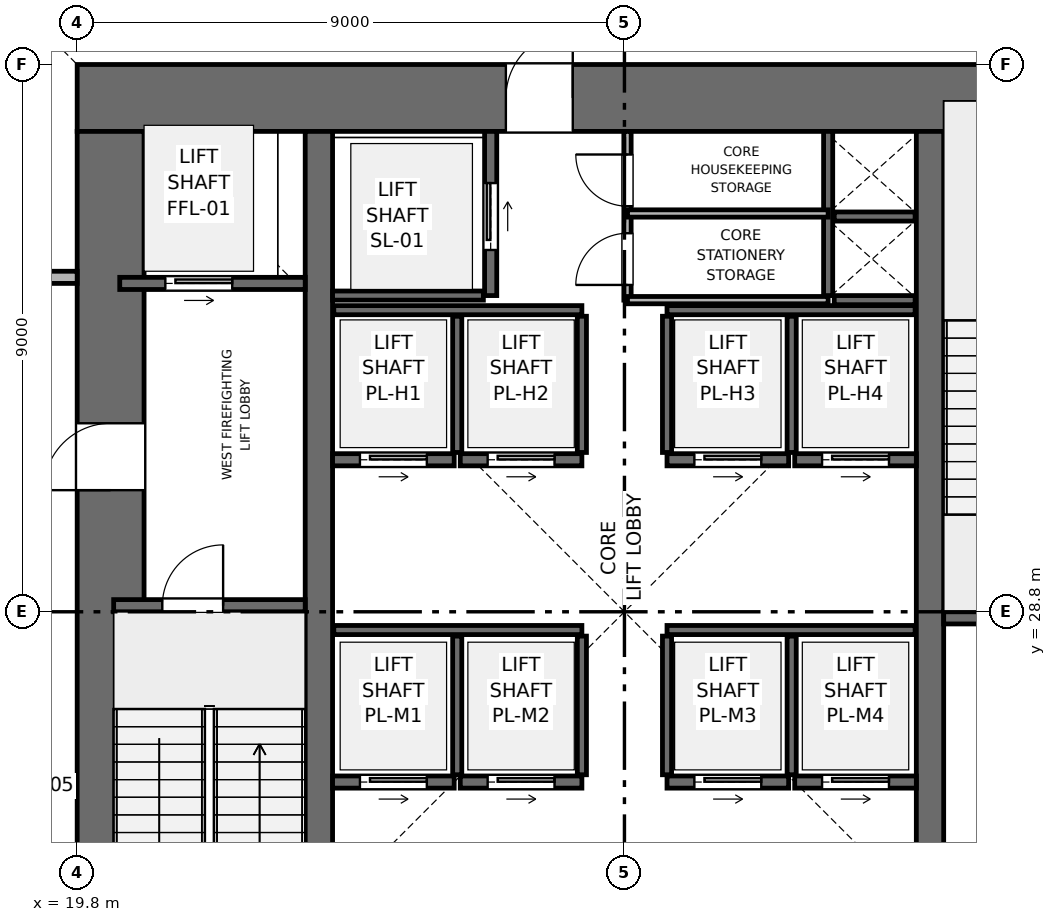
"""IFC4 building model, lengths in metres.
Left out: names, types, materials, properties, quantities, classifications, styles, units other than length and angle.
Written with IfcOpenShell. Run it as: python <this file> out.ifc"""

import sys

from ifc_helpers import new_model, si_unit, direction, frame, frame_2d, origin, place, context, subcontext, project, spatial, rectangle, extrude, element, fill, save


model = new_model("IFC4")
c1 = context("Model", 3, precision=1e-05, world=origin(), true_north=direction((0.0, 1.0)))
c2 = subcontext(c1, "Body", "Model", "MODEL_VIEW")
j1 = project(units=[si_unit("LENGTHUNIT", "METRE"), si_unit("PLANEANGLEUNIT", "RADIAN")], contexts=[c1])
p1 = place(None, origin())
s1 = spatial("IfcSite", under=j1, at=p1, CompositionType="ELEMENT")
p2 = place(p1, origin())
s2 = spatial("IfcBuilding", under=s1, at=p2, CompositionType="ELEMENT")
p3 = place(p2, origin())
s3 = spatial("IfcBuildingStorey", under=s2, at=p3, CompositionType="ELEMENT", Elevation=0.0)
p4 = place(p3, frame((19.8, 37.25, 0.0), z_axis=(0.0, 0.0, 1.0), x_axis=(1.0, 0.0, 0.0)))
e1 = element("IfcWall", 1, at=p4, inside=s3, PredefinedType="SHEAR", context=c2, shape_type="SweptSolid", body=[
    extrude(rectangle(XDim=18.0, YDim=1.1, at=frame_2d((9.0, 0.0))), origin(), (0.0, 0.0, 1.0), 8.4),
])
p5 = place(p4, frame((7.05, 0.0, 0.0)))
e2 = element("IfcOpeningElement", 2, at=p5, cuts=e1, PredefinedType="OPENING", context=c2, shape_type="SweptSolid", body=[
    extrude(rectangle(XDim=1.1, YDim=2.15, at=frame_2d((0.55, 1.075))), frame((0.0, 0.56, 0.0), z_axis=(0.0, -1.0, 0.0), x_axis=(1.0, 0.0, 0.0)), (0.0, 0.0, 1.0), 1.12),
])
p6 = place(p3, frame((20.35, 20.9, 0.0), z_axis=(0.0, 0.0, 1.0), x_axis=(0.0, 1.0, 0.0)))
e3 = element("IfcWall", 3, at=p6, inside=s3, PredefinedType="SHEAR", context=c2, shape_type="SweptSolid", body=[
    extrude(rectangle(XDim=15.8, YDim=1.1, at=frame_2d((7.9, 0.0))), origin(), (0.0, 0.0, 1.0), 8.4),
])
p7 = place(p6, frame((9.9, 0.0, 0.0)))
e4 = element("IfcOpeningElement", 4, at=p7, cuts=e3, PredefinedType="OPENING", context=c2, shape_type="SweptSolid", body=[
    extrude(rectangle(XDim=1.1, YDim=2.15, at=frame_2d((0.55, 1.075))), frame((0.0, 0.56, 0.0), z_axis=(0.0, -1.0, 0.0), x_axis=(1.0, 0.0, 0.0)), (0.0, 0.0, 1.0), 1.12),
])
for number, where, z_axis, x_axis in (
    (5, (23.775, 20.9, 0.0), (0.0, 0.0, 1.0), (0.0, 1.0, 0.0)),
    (6, (33.825, 20.9, 0.0), (0.0, 0.0, 1.0), (0.0, 1.0, 0.0)),
):
    element("IfcWall", number, at=place(p3, frame(where, z_axis=z_axis, x_axis=x_axis)), inside=s3, PredefinedType="SHEAR", context=c2, shape_type="SweptSolid", body=[
        extrude(rectangle(XDim=15.8, YDim=0.45, at=frame_2d((7.9, 0.0))), origin(), (0.0, 0.0, 1.0), 8.4),
    ])
p8 = place(p3, frame((20.4, 28.9, 0.0), z_axis=(0.0, 0.0, 1.0), x_axis=(1.0, 0.0, 0.0)))
e7 = element("IfcWall", 7, at=p8, inside=s3, PredefinedType="SHEAR", context=c2, shape_type="SweptSolid", body=[
    extrude(rectangle(XDim=3.15, YDim=0.2, at=frame_2d((1.575, 0.0))), origin(), (0.0, 0.0, 1.0), 8.05),
])
p9 = place(p8, frame((0.8, 0.0, 0.0)))
e8 = element("IfcOpeningElement", 8, at=p9, cuts=e7, PredefinedType="OPENING", context=c2, shape_type="SweptSolid", body=[
    extrude(rectangle(XDim=1.0, YDim=2.1, at=frame_2d((0.5, 1.05))), frame((0.0, 0.11, 0.0), z_axis=(0.0, -1.0, 0.0), x_axis=(1.0, 0.0, 0.0)), (0.0, 0.0, 1.0), 0.22),
])
p10 = place(p3, frame((34.05, 28.7, 0.0), z_axis=(0.0, 0.0, 1.0), x_axis=(1.0, 0.0, 0.0)))
e9 = element("IfcWall", 9, at=p10, inside=s3, PredefinedType="SHEAR", context=c2, shape_type="SweptSolid", body=[
    extrude(rectangle(XDim=3.15, YDim=0.2, at=frame_2d((1.575, 0.0))), origin(), (0.0, 0.0, 1.0), 8.05),
])
p11 = place(p10, frame((0.8, 0.0, 0.0)))
e10 = element("IfcOpeningElement", 10, at=p11, cuts=e9, PredefinedType="OPENING", context=c2, shape_type="SweptSolid", body=[
    extrude(rectangle(XDim=1.0, YDim=2.1, at=frame_2d((0.5, 1.05))), frame((0.0, 0.11, 0.0), z_axis=(0.0, -1.0, 0.0), x_axis=(1.0, 0.0, 0.0)), (0.0, 0.0, 1.0), 0.22),
])
p12 = place(p3, frame((32.15, 34.0, 0.0), z_axis=(0.0, 0.0, 1.0), x_axis=(0.0, 1.0, 0.0)))
e11 = element("IfcWall", 11, at=p12, inside=s3, PredefinedType="SHEAR", context=c2, shape_type="SweptSolid", body=[
    extrude(rectangle(XDim=2.7, YDim=0.15, at=frame_2d((1.35, 0.0))), origin(), (0.0, 0.0, 1.0), 8.05),
])
for number, where, z_axis, x_axis in (
    (12, (32.25, 33.925, 0.0), (0.0, 0.0, 1.0), (1.0, 0.0, 0.0)),
    (13, (32.25, 35.3, 0.0), (0.0, 0.0, 1.0), (1.0, 0.0, 0.0)),
):
    element("IfcWall", number, at=place(p3, frame(where, z_axis=z_axis, x_axis=x_axis)), inside=s3, PredefinedType="SHEAR", context=c2, shape_type="SweptSolid", body=[
        extrude(rectangle(XDim=1.33, YDim=0.15, at=frame_2d((0.665, 0.0))), origin(), (0.0, 0.0, 1.0), 8.05),
    ])
p13 = place(p3, frame((20.5, 34.2, 0.0), z_axis=(0.0, 0.0, 1.0), x_axis=(1.0, 0.0, 0.0)))
e14 = element("IfcWall", 14, at=p13, inside=s3, PredefinedType="SHEAR", context=c2, shape_type="SweptSolid", body=[
    extrude(rectangle(XDim=3.05, YDim=0.2, at=frame_2d((1.525, 0.0))), origin(), (0.0, 0.0, 1.0), 8.05),
])
p14 = place(p13, frame((0.75, 0.0, 0.0)))
e15 = element("IfcOpeningElement", 15, at=p14, cuts=e14, PredefinedType="OPENING", context=c2, shape_type="SweptSolid", body=[
    extrude(rectangle(XDim=1.1, YDim=2.15, at=frame_2d((0.55, 1.075))), frame((0.0, 0.11, 0.0), z_axis=(0.0, -1.0, 0.0), x_axis=(1.0, 0.0, 0.0)), (0.0, 0.0, 1.0), 0.22),
])
p15 = place(p3, frame((26.6, 34.0, 0.0), z_axis=(0.0, 0.0, 1.0), x_axis=(0.0, 1.0, 0.0)))
e16 = element("IfcWall", 16, at=p15, inside=s3, PredefinedType="SHEAR", context=c2, shape_type="SweptSolid", body=[
    extrude(rectangle(XDim=2.7, YDim=0.2, at=frame_2d((1.35, 0.0))), origin(), (0.0, 0.0, 1.0), 8.05),
])
p16 = place(p15, frame((0.75, 0.0, 0.0)))
e17 = element("IfcOpeningElement", 17, at=p16, cuts=e16, PredefinedType="OPENING", context=c2, shape_type="SweptSolid", body=[
    extrude(rectangle(XDim=1.1, YDim=2.15, at=frame_2d((0.55, 1.075))), frame((0.0, 0.11, 0.0), z_axis=(0.0, -1.0, 0.0), x_axis=(1.0, 0.0, 0.0)), (0.0, 0.0, 1.0), 0.22),
])
p17 = place(p3, frame((24.0, 34.0, 0.0), z_axis=(0.0, 0.0, 1.0), x_axis=(1.0, 0.0, 0.0)))
e18 = element("IfcWall", 18, at=p17, inside=s3, PredefinedType="SHEAR", context=c2, shape_type="SweptSolid", body=[
    extrude(rectangle(XDim=2.48, YDim=0.15, at=frame_2d((1.24, 0.0))), origin(), (0.0, 0.0, 1.0), 8.05),
])
p18 = place(p3, frame((24.0, 26.0, 0.0), z_axis=(0.0, 0.0, 1.0), x_axis=(1.0, 0.0, 0.0)))
e19 = element("IfcWall", 19, at=p18, inside=s3, PredefinedType="SHEAR", context=c2, shape_type="SweptSolid", body=[
    extrude(rectangle(XDim=2.0, YDim=0.2, at=frame_2d((1.0, 0.0))), origin(), (0.0, 0.0, 1.0), 8.05),
])
p19 = place(p18, frame((0.45, 0.0, 0.0)))
e20 = element("IfcOpeningElement", 20, at=p19, cuts=e19, PredefinedType="OPENING", context=c2, shape_type="SweptSolid", body=[
    extrude(rectangle(XDim=1.1, YDim=2.15, at=frame_2d((0.55, 1.075))), frame((0.0, 0.11, 0.0), z_axis=(0.0, -1.0, 0.0), x_axis=(1.0, 0.0, 0.0)), (0.0, 0.0, 1.0), 0.22),
])
p20 = place(p3, frame((26.1, 26.0, 0.0), z_axis=(0.0, 0.0, 1.0), x_axis=(1.0, 0.0, 0.0)))
e21 = element("IfcWall", 21, at=p20, inside=s3, PredefinedType="SHEAR", context=c2, shape_type="SweptSolid", body=[
    extrude(rectangle(XDim=2.0, YDim=0.2, at=frame_2d((1.0, 0.0))), origin(), (0.0, 0.0, 1.0), 8.05),
])
p21 = place(p20, frame((0.45, 0.0, 0.0)))
e22 = element("IfcOpeningElement", 22, at=p21, cuts=e21, PredefinedType="OPENING", context=c2, shape_type="SweptSolid", body=[
    extrude(rectangle(XDim=1.1, YDim=2.15, at=frame_2d((0.55, 1.075))), frame((0.0, 0.11, 0.0), z_axis=(0.0, -1.0, 0.0), x_axis=(1.0, 0.0, 0.0)), (0.0, 0.0, 1.0), 0.22),
])
p22 = place(p3, frame((29.5, 26.0, 0.0), z_axis=(0.0, 0.0, 1.0), x_axis=(1.0, 0.0, 0.0)))
e23 = element("IfcWall", 23, at=p22, inside=s3, PredefinedType="SHEAR", context=c2, shape_type="SweptSolid", body=[
    extrude(rectangle(XDim=2.0, YDim=0.2, at=frame_2d((1.0, 0.0))), origin(), (0.0, 0.0, 1.0), 8.05),
])
p23 = place(p22, frame((0.45, 0.0, 0.0)))
e24 = element("IfcOpeningElement", 24, at=p23, cuts=e23, PredefinedType="OPENING", context=c2, shape_type="SweptSolid", body=[
    extrude(rectangle(XDim=1.1, YDim=2.15, at=frame_2d((0.55, 1.075))), frame((0.0, 0.11, 0.0), z_axis=(0.0, -1.0, 0.0), x_axis=(1.0, 0.0, 0.0)), (0.0, 0.0, 1.0), 0.22),
])
p24 = place(p3, frame((31.6, 26.0, 0.0), z_axis=(0.0, 0.0, 1.0), x_axis=(1.0, 0.0, 0.0)))
e25 = element("IfcWall", 25, at=p24, inside=s3, PredefinedType="SHEAR", context=c2, shape_type="SweptSolid", body=[
    extrude(rectangle(XDim=2.0, YDim=0.2, at=frame_2d((1.0, 0.0))), origin(), (0.0, 0.0, 1.0), 8.05),
])
p25 = place(p24, frame((0.45, 0.0, 0.0)))
e26 = element("IfcOpeningElement", 26, at=p25, cuts=e25, PredefinedType="OPENING", context=c2, shape_type="SweptSolid", body=[
    extrude(rectangle(XDim=1.1, YDim=2.15, at=frame_2d((0.55, 1.075))), frame((0.0, 0.11, 0.0), z_axis=(0.0, -1.0, 0.0), x_axis=(1.0, 0.0, 0.0)), (0.0, 0.0, 1.0), 0.22),
])
p26 = place(p3, frame((24.0, 31.3, 0.0), z_axis=(0.0, 0.0, 1.0), x_axis=(1.0, 0.0, 0.0)))
e27 = element("IfcWall", 27, at=p26, inside=s3, PredefinedType="SHEAR", context=c2, shape_type="SweptSolid", body=[
    extrude(rectangle(XDim=2.0, YDim=0.2, at=frame_2d((1.0, 0.0))), origin(), (0.0, 0.0, 1.0), 8.05),
])
p27 = place(p26, frame((0.45, 0.0, 0.0)))
e28 = element("IfcOpeningElement", 28, at=p27, cuts=e27, PredefinedType="OPENING", context=c2, shape_type="SweptSolid", body=[
    extrude(rectangle(XDim=1.1, YDim=2.15, at=frame_2d((0.55, 1.075))), frame((0.0, 0.11, 0.0), z_axis=(0.0, -1.0, 0.0), x_axis=(1.0, 0.0, 0.0)), (0.0, 0.0, 1.0), 0.22),
])
p28 = place(p3, frame((26.1, 31.3, 0.0), z_axis=(0.0, 0.0, 1.0), x_axis=(1.0, 0.0, 0.0)))
e29 = element("IfcWall", 29, at=p28, inside=s3, PredefinedType="SHEAR", context=c2, shape_type="SweptSolid", body=[
    extrude(rectangle(XDim=2.0, YDim=0.2, at=frame_2d((1.0, 0.0))), origin(), (0.0, 0.0, 1.0), 8.05),
])
p29 = place(p28, frame((0.45, 0.0, 0.0)))
e30 = element("IfcOpeningElement", 30, at=p29, cuts=e29, PredefinedType="OPENING", context=c2, shape_type="SweptSolid", body=[
    extrude(rectangle(XDim=1.1, YDim=2.15, at=frame_2d((0.55, 1.075))), frame((0.0, 0.11, 0.0), z_axis=(0.0, -1.0, 0.0), x_axis=(1.0, 0.0, 0.0)), (0.0, 0.0, 1.0), 0.22),
])
p30 = place(p3, frame((29.5, 31.3, 0.0), z_axis=(0.0, 0.0, 1.0), x_axis=(1.0, 0.0, 0.0)))
e31 = element("IfcWall", 31, at=p30, inside=s3, PredefinedType="SHEAR", context=c2, shape_type="SweptSolid", body=[
    extrude(rectangle(XDim=2.0, YDim=0.2, at=frame_2d((1.0, 0.0))), origin(), (0.0, 0.0, 1.0), 8.05),
])
p31 = place(p30, frame((0.45, 0.0, 0.0)))
e32 = element("IfcOpeningElement", 32, at=p31, cuts=e31, PredefinedType="OPENING", context=c2, shape_type="SweptSolid", body=[
    extrude(rectangle(XDim=1.1, YDim=2.15, at=frame_2d((0.55, 1.075))), frame((0.0, 0.11, 0.0), z_axis=(0.0, -1.0, 0.0), x_axis=(1.0, 0.0, 0.0)), (0.0, 0.0, 1.0), 0.22),
])
p32 = place(p3, frame((31.6, 31.3, 0.0), z_axis=(0.0, 0.0, 1.0), x_axis=(1.0, 0.0, 0.0)))
e33 = element("IfcWall", 33, at=p32, inside=s3, PredefinedType="SHEAR", context=c2, shape_type="SweptSolid", body=[
    extrude(rectangle(XDim=2.0, YDim=0.2, at=frame_2d((1.0, 0.0))), origin(), (0.0, 0.0, 1.0), 8.05),
])
p33 = place(p32, frame((0.45, 0.0, 0.0)))
e34 = element("IfcOpeningElement", 34, at=p33, cuts=e33, PredefinedType="OPENING", context=c2, shape_type="SweptSolid", body=[
    extrude(rectangle(XDim=1.1, YDim=2.15, at=frame_2d((0.55, 1.075))), frame((0.0, 0.11, 0.0), z_axis=(0.0, -1.0, 0.0), x_axis=(1.0, 0.0, 0.0)), (0.0, 0.0, 1.0), 0.22),
])
for number, where, z_axis, x_axis in (
    (35, (24.02, 28.5, 0.0), (0.0, 0.0, 1.0), (1.0, 0.0, 0.0)),
    (36, (29.5, 28.5, 0.0), (0.0, 0.0, 1.0), (1.0, 0.0, 0.0)),
):
    element("IfcWall", number, at=place(p3, frame(where, z_axis=z_axis, x_axis=x_axis)), inside=s3, PredefinedType="SHEAR", context=c2, shape_type="SweptSolid", body=[
        extrude(rectangle(XDim=4.08, YDim=0.15, at=frame_2d((2.04, 0.0))), origin(), (0.0, 0.0, 1.0), 8.05),
    ])
for number, where, z_axis, x_axis in (
    (37, (26.05, 26.12, 0.0), (0.0, 0.0, 1.0), (0.0, 1.0, 0.0)),
    (38, (28.1, 26.12, 0.0), (0.0, 0.0, 1.0), (0.0, 1.0, 0.0)),
    (39, (29.5, 26.12, 0.0), (0.0, 0.0, 1.0), (0.0, 1.0, 0.0)),
    (40, (31.55, 26.12, 0.0), (0.0, 0.0, 1.0), (0.0, 1.0, 0.0)),
):
    element("IfcWall", number, at=place(p3, frame(where, z_axis=z_axis, x_axis=x_axis)), inside=s3, PredefinedType="SHEAR", context=c2, shape_type="SweptSolid", body=[
        extrude(rectangle(XDim=2.28, YDim=0.15, at=frame_2d((1.14, 0.0))), origin(), (0.0, 0.0, 1.0), 8.05),
    ])
for number, where, z_axis, x_axis in (
    (41, (24.02, 33.76, 0.0), (0.0, 0.0, 1.0), (1.0, 0.0, 0.0)),
    (42, (29.5, 33.76, 0.0), (0.0, 0.0, 1.0), (1.0, 0.0, 0.0)),
):
    element("IfcWall", number, at=place(p3, frame(where, z_axis=z_axis, x_axis=x_axis)), inside=s3, PredefinedType="SHEAR", context=c2, shape_type="SweptSolid", body=[
        extrude(rectangle(XDim=4.08, YDim=0.15, at=frame_2d((2.04, 0.0))), origin(), (0.0, 0.0, 1.0), 8.05),
    ])
for number, where, z_axis, x_axis in (
    (43, (26.05, 31.42, 0.0), (0.0, 0.0, 1.0), (0.0, 1.0, 0.0)),
    (44, (28.1, 31.42, 0.0), (0.0, 0.0, 1.0), (0.0, 1.0, 0.0)),
    (45, (29.5, 31.42, 0.0), (0.0, 0.0, 1.0), (0.0, 1.0, 0.0)),
    (46, (31.55, 31.42, 0.0), (0.0, 0.0, 1.0), (0.0, 1.0, 0.0)),
):
    element("IfcWall", number, at=place(p3, frame(where, z_axis=z_axis, x_axis=x_axis)), inside=s3, PredefinedType="SHEAR", context=c2, shape_type="SweptSolid", body=[
        extrude(rectangle(XDim=2.24, YDim=0.15, at=frame_2d((1.12, 0.0))), origin(), (0.0, 0.0, 1.0), 8.05),
    ])
p34 = place(p3, frame((28.85, 33.925, 0.0), z_axis=(0.0, 0.0, 1.0), x_axis=(0.0, 1.0, 0.0)))
e47 = element("IfcWall", 47, at=p34, inside=s3, PredefinedType="PARTITIONING", context=c2, shape_type="SweptSolid", body=[
    extrude(rectangle(XDim=2.775, YDim=0.12, at=frame_2d((1.387, 0.0))), origin(), (0.0, 0.0, 1.0), 8.05),
])
p35 = place(p34, frame((0.25, 0.0, 0.0)))
e48 = element("IfcOpeningElement", 48, at=p35, cuts=e47, PredefinedType="OPENING", context=c2, shape_type="SweptSolid", body=[
    extrude(rectangle(XDim=0.85, YDim=2.1, at=frame_2d((0.425, 1.05))), frame((0.0, 0.07, 0.0), z_axis=(0.0, -1.0, 0.0), x_axis=(1.0, 0.0, 0.0)), (0.0, 0.0, 1.0), 0.14),
])
p36 = place(p34, frame((1.545, 0.0, 0.0)))
e49 = element("IfcOpeningElement", 49, at=p36, cuts=e47, PredefinedType="OPENING", context=c2, shape_type="SweptSolid", body=[
    extrude(rectangle(XDim=0.85, YDim=2.1, at=frame_2d((0.425, 1.05))), frame((0.0, 0.07, 0.0), z_axis=(0.0, -1.0, 0.0), x_axis=(1.0, 0.0, 0.0)), (0.0, 0.0, 1.0), 0.14),
])
for number, where, z_axis, x_axis in (
    (50, (28.85, 35.35, 0.0), (0.0, 0.0, 1.0), (1.0, 0.0, 0.0)),
    (51, (28.85, 33.925, 0.0), (0.0, 0.0, 1.0), (1.0, 0.0, 0.0)),
):
    element("IfcWall", number, at=place(p3, frame(where, z_axis=z_axis, x_axis=x_axis)), inside=s3, PredefinedType="PARTITIONING", context=c2, shape_type="SweptSolid", body=[
        extrude(rectangle(XDim=3.3, YDim=0.12, at=frame_2d((1.65, 0.0))), origin(), (0.0, 0.0, 1.0), 8.05),
    ])
p37 = place(p3, frame((9.15, 34.3, 0.0), z_axis=(0.0, 0.0, 1.0), x_axis=(1.0, 0.0, 0.0)))
e52 = element("IfcWall", 52, at=p37, inside=s3, PredefinedType="PARTITIONING", context=c2, shape_type="SweptSolid", body=[
    extrude(rectangle(XDim=10.65, YDim=0.2, at=frame_2d((5.325, 0.0))), origin(), (0.0, 0.0, 1.0), 8.05),
])
p38 = place(p37, frame((4.2, 0.0, 0.0)))
e53 = element("IfcOpeningElement", 53, at=p38, cuts=e52, PredefinedType="OPENING", context=c2, shape_type="SweptSolid", body=[
    extrude(rectangle(XDim=1.0, YDim=2.15, at=frame_2d((0.5, 1.075))), frame((0.0, 0.11, 0.0), z_axis=(0.0, -1.0, 0.0), x_axis=(1.0, 0.0, 0.0)), (0.0, 0.0, 1.0), 0.22),
])
p39 = place(p9, origin())
e54 = element("IfcDoor", 54, at=p39, inside=s3, OperationType="SINGLE_SWING_RIGHT", PredefinedType="DOOR", context=c2, shape_type="SweptSolid", body=[
    extrude(rectangle(XDim=1.0, YDim=2.1, at=frame_2d((0.5, 1.05))), frame((0.0, 0.025, 0.0), z_axis=(0.0, -1.0, 0.0), x_axis=(1.0, 0.0, 0.0)), (0.0, 0.0, 1.0), 0.05),
])
fill(e8, e54)
p40 = place(p14, origin())
e55 = element("IfcDoor", 55, at=p40, inside=s3, OperationType="SLIDING_TO_RIGHT", PredefinedType="DOOR", context=c2, shape_type="SweptSolid", body=[
    extrude(rectangle(XDim=1.1, YDim=2.15, at=frame_2d((0.55, 1.075))), frame((0.0, 0.025, 0.0), z_axis=(0.0, -1.0, 0.0), x_axis=(1.0, 0.0, 0.0)), (0.0, 0.0, 1.0), 0.05),
])
fill(e15, e55)
p41 = place(p16, origin())
e56 = element("IfcDoor", 56, at=p41, inside=s3, OperationType="SLIDING_TO_RIGHT", PredefinedType="DOOR", context=c2, shape_type="SweptSolid", body=[
    extrude(rectangle(XDim=1.1, YDim=2.15, at=frame_2d((0.55, 1.075))), frame((0.0, 0.025, 0.0), z_axis=(0.0, -1.0, 0.0), x_axis=(1.0, 0.0, 0.0)), (0.0, 0.0, 1.0), 0.05),
])
fill(e17, e56)
p42 = place(p19, origin())
e57 = element("IfcDoor", 57, at=p42, inside=s3, OperationType="SLIDING_TO_RIGHT", PredefinedType="DOOR", context=c2, shape_type="SweptSolid", body=[
    extrude(rectangle(XDim=1.1, YDim=2.15, at=frame_2d((0.55, 1.075))), frame((0.0, 0.025, 0.0), z_axis=(0.0, -1.0, 0.0), x_axis=(1.0, 0.0, 0.0)), (0.0, 0.0, 1.0), 0.05),
])
fill(e20, e57)
p43 = place(p21, origin())
e58 = element("IfcDoor", 58, at=p43, inside=s3, OperationType="SLIDING_TO_RIGHT", PredefinedType="DOOR", context=c2, shape_type="SweptSolid", body=[
    extrude(rectangle(XDim=1.1, YDim=2.15, at=frame_2d((0.55, 1.075))), frame((0.0, 0.025, 0.0), z_axis=(0.0, -1.0, 0.0), x_axis=(1.0, 0.0, 0.0)), (0.0, 0.0, 1.0), 0.05),
])
fill(e22, e58)
p44 = place(p23, origin())
e59 = element("IfcDoor", 59, at=p44, inside=s3, OperationType="SLIDING_TO_RIGHT", PredefinedType="DOOR", context=c2, shape_type="SweptSolid", body=[
    extrude(rectangle(XDim=1.1, YDim=2.15, at=frame_2d((0.55, 1.075))), frame((0.0, 0.025, 0.0), z_axis=(0.0, -1.0, 0.0), x_axis=(1.0, 0.0, 0.0)), (0.0, 0.0, 1.0), 0.05),
])
fill(e24, e59)
p45 = place(p25, origin())
e60 = element("IfcDoor", 60, at=p45, inside=s3, OperationType="SLIDING_TO_RIGHT", PredefinedType="DOOR", context=c2, shape_type="SweptSolid", body=[
    extrude(rectangle(XDim=1.1, YDim=2.15, at=frame_2d((0.55, 1.075))), frame((0.0, 0.025, 0.0), z_axis=(0.0, -1.0, 0.0), x_axis=(1.0, 0.0, 0.0)), (0.0, 0.0, 1.0), 0.05),
])
fill(e26, e60)
p46 = place(p27, origin())
e61 = element("IfcDoor", 61, at=p46, inside=s3, OperationType="SLIDING_TO_RIGHT", PredefinedType="DOOR", context=c2, shape_type="SweptSolid", body=[
    extrude(rectangle(XDim=1.1, YDim=2.15, at=frame_2d((0.55, 1.075))), frame((0.0, 0.025, 0.0), z_axis=(0.0, -1.0, 0.0), x_axis=(1.0, 0.0, 0.0)), (0.0, 0.0, 1.0), 0.05),
])
fill(e28, e61)
p47 = place(p29, origin())
e62 = element("IfcDoor", 62, at=p47, inside=s3, OperationType="SLIDING_TO_RIGHT", PredefinedType="DOOR", context=c2, shape_type="SweptSolid", body=[
    extrude(rectangle(XDim=1.1, YDim=2.15, at=frame_2d((0.55, 1.075))), frame((0.0, 0.025, 0.0), z_axis=(0.0, -1.0, 0.0), x_axis=(1.0, 0.0, 0.0)), (0.0, 0.0, 1.0), 0.05),
])
fill(e30, e62)
p48 = place(p31, origin())
e63 = element("IfcDoor", 63, at=p48, inside=s3, OperationType="SLIDING_TO_RIGHT", PredefinedType="DOOR", context=c2, shape_type="SweptSolid", body=[
    extrude(rectangle(XDim=1.1, YDim=2.15, at=frame_2d((0.55, 1.075))), frame((0.0, 0.025, 0.0), z_axis=(0.0, -1.0, 0.0), x_axis=(1.0, 0.0, 0.0)), (0.0, 0.0, 1.0), 0.05),
])
fill(e32, e63)
p49 = place(p33, origin())
e64 = element("IfcDoor", 64, at=p49, inside=s3, OperationType="SLIDING_TO_RIGHT", PredefinedType="DOOR", context=c2, shape_type="SweptSolid", body=[
    extrude(rectangle(XDim=1.1, YDim=2.15, at=frame_2d((0.55, 1.075))), frame((0.0, 0.025, 0.0), z_axis=(0.0, -1.0, 0.0), x_axis=(1.0, 0.0, 0.0)), (0.0, 0.0, 1.0), 0.05),
])
fill(e34, e64)
p50 = place(p35, origin())
e65 = element("IfcDoor", 65, at=p50, inside=s3, OperationType="SINGLE_SWING_LEFT", PredefinedType="DOOR", context=c2, shape_type="SweptSolid", body=[
    extrude(rectangle(XDim=0.85, YDim=2.1, at=frame_2d((0.425, 1.05))), frame((0.0, 0.025, 0.0), z_axis=(0.0, -1.0, 0.0), x_axis=(1.0, 0.0, 0.0)), (0.0, 0.0, 1.0), 0.05),
])
fill(e48, e65)
p51 = place(p36, origin())
e66 = element("IfcDoor", 66, at=p51, inside=s3, OperationType="SINGLE_SWING_RIGHT", PredefinedType="DOOR", context=c2, shape_type="SweptSolid", body=[
    extrude(rectangle(XDim=0.85, YDim=2.1, at=frame_2d((0.425, 1.05))), frame((0.0, 0.025, 0.0), z_axis=(0.0, -1.0, 0.0), x_axis=(1.0, 0.0, 0.0)), (0.0, 0.0, 1.0), 0.05),
])
fill(e49, e66)
p52 = place(p7, origin())
e67 = element("IfcDoor", 67, at=p52, inside=s3, OperationType="SINGLE_SWING_LEFT", PredefinedType="DOOR", context=c2, shape_type="SweptSolid", body=[
    extrude(rectangle(XDim=1.1, YDim=2.15, at=frame_2d((0.55, 1.075))), frame((0.0, 0.025, 0.0), z_axis=(0.0, -1.0, 0.0), x_axis=(1.0, 0.0, 0.0)), (0.0, 0.0, 1.0), 0.05),
])
fill(e4, e67)
p53 = place(p5, origin())
e68 = element("IfcDoor", 68, at=p53, inside=s3, OperationType="SINGLE_SWING_RIGHT", PredefinedType="DOOR", context=c2, shape_type="SweptSolid", body=[
    extrude(rectangle(XDim=1.1, YDim=2.15, at=frame_2d((0.55, 1.075))), frame((0.0, 0.025, 0.0), z_axis=(0.0, -1.0, 0.0), x_axis=(1.0, 0.0, 0.0)), (0.0, 0.0, 1.0), 0.05),
])
fill(e2, e68)
save(model, sys.argv[1])
